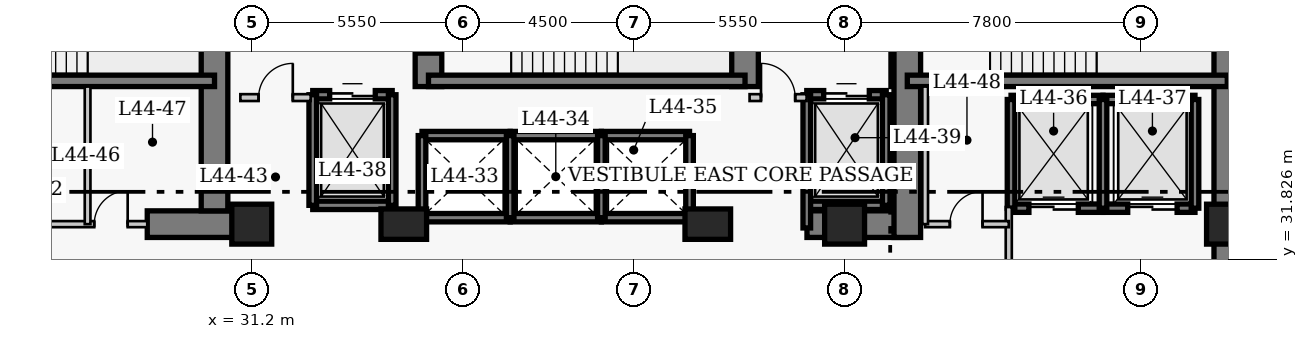
"""IFC4 building model, lengths in metres.
Left out: names, types, materials, properties, quantities, classifications, styles, units other than length and angle.
Written with IfcOpenShell. Run it as: python <this file> out.ifc"""

import sys

from ifc_helpers import new_model, si_unit, direction, frame, frame_2d, origin, origin_2d, place, context, subcontext, project, spatial, rectangle, extrude, element, fill, save


model = new_model("IFC4")
c1 = context("Model", 3, precision=1e-05, world=origin(), true_north=direction((0.0, 1.0)))
c2 = subcontext(c1, "Body", "Model", "MODEL_VIEW")
j1 = project(units=[si_unit("LENGTHUNIT", "METRE"), si_unit("PLANEANGLEUNIT", "RADIAN")], contexts=[c1])
p1 = place(None, origin())
s1 = spatial("IfcSite", under=j1, at=p1, CompositionType="ELEMENT")
p2 = place(p1, origin())
s2 = spatial("IfcBuilding", under=s1, at=p2, CompositionType="ELEMENT")
p3 = place(p2, frame((0.0, 0.0, 176.4)))
s3 = spatial("IfcBuildingStorey", under=s2, at=p3, CompositionType="ELEMENT", Elevation=176.4)
p4 = place(p3, frame((56.87, 27.05, 0.0), z_axis=(0.0, 0.0, 1.0), x_axis=(0.0, 1.0, 0.0)))
e1 = element("IfcWall", 1, at=p4, inside=s3, PredefinedType="SHEAR", context=c2, shape_type="SweptSolid", body=[
    extrude(rectangle(XDim=13.62, YDim=0.7, at=frame_2d((6.81, 0.0))), origin(), (0.0, 0.0, 1.0), 3.8),
])
p5 = place(p3, frame((28.45, 32.75, 0.0), z_axis=(0.0, 0.0, 1.0), x_axis=(1.0, 0.0, 0.0)))
e2 = element("IfcWall", 2, at=p5, inside=s3, PredefinedType="SHEAR", context=c2, shape_type="SweptSolid", body=[
    extrude(rectangle(XDim=2.4, YDim=0.7, at=frame_2d((1.2, 0.0))), origin(), (0.0, 0.0, 1.0), 3.8),
])
p6 = place(p3, frame((45.81, 32.75, 0.0), z_axis=(0.0, 0.0, 1.0), x_axis=(1.0, 0.0, 0.0)))
e3 = element("IfcWall", 3, at=p6, inside=s3, PredefinedType="SHEAR", context=c2, shape_type="SweptSolid", body=[
    extrude(rectangle(XDim=2.64, YDim=0.7, at=frame_2d((1.32, 0.0))), origin(), (0.0, 0.0, 1.0), 3.8),
])
p7 = place(p3, frame((30.22, 33.1, 0.0), z_axis=(0.0, 0.0, 1.0), x_axis=(0.0, 1.0, 0.0)))
e4 = element("IfcWall", 4, at=p7, inside=s3, PredefinedType="SHEAR", context=c2, shape_type="SweptSolid", body=[
    extrude(rectangle(XDim=7.22, YDim=0.7, at=frame_2d((3.61, 0.0))), origin(), (0.0, 0.0, 1.0), 3.8),
])
p8 = place(p3, frame((35.85, 36.37, 0.0), z_axis=(0.0, 0.0, 1.0), x_axis=(0.0, 1.0, 0.0)))
e5 = element("IfcWall", 5, at=p8, inside=s3, PredefinedType="SHEAR", context=c2, shape_type="SweptSolid", body=[
    extrude(rectangle(XDim=3.95, YDim=0.7, at=frame_2d((1.975, 0.0))), origin(), (0.0, 0.0, 1.0), 3.8),
])
p9 = place(p8, frame((0.88, 0.0, 0.0)))
e6 = element("IfcOpeningElement", 6, at=p9, cuts=e5, PredefinedType="OPENING", context=c2, shape_type="SweptSolid", body=[
    extrude(rectangle(XDim=1.1, YDim=2.15, at=frame_2d((0.55, 1.075))), frame((0.0, 0.36, 0.0), z_axis=(0.0, -1.0, 0.0), x_axis=(1.0, 0.0, 0.0)), (0.0, 0.0, 1.0), 0.72),
])
p10 = place(p3, frame((44.18, 36.37, 0.0), z_axis=(0.0, 0.0, 1.0), x_axis=(0.0, 1.0, 0.0)))
e7 = element("IfcWall", 7, at=p10, inside=s3, PredefinedType="SHEAR", context=c2, shape_type="SweptSolid", body=[
    extrude(rectangle(XDim=3.95, YDim=0.7, at=frame_2d((1.975, 0.0))), origin(), (0.0, 0.0, 1.0), 3.8),
])
p11 = place(p3, frame((48.45, 32.4, 0.0), z_axis=(0.0, 0.0, 1.0), x_axis=(0.0, 1.0, 0.0)))
e8 = element("IfcWall", 8, at=p11, inside=s3, PredefinedType="SHEAR", context=c2, shape_type="SweptSolid", body=[
    extrude(rectangle(XDim=7.92, YDim=0.7, at=frame_2d((3.96, 0.0))), origin(), (0.0, 0.0, 1.0), 3.8),
])
p12 = place(p11, frame((5.8, 0.0, 0.0)))
e9 = element("IfcOpeningElement", 9, at=p12, cuts=e8, PredefinedType="OPENING", context=c2, shape_type="SweptSolid", body=[
    extrude(rectangle(XDim=1.1, YDim=2.15, at=frame_2d((0.55, 1.075))), frame((0.0, 0.36, 0.0), z_axis=(0.0, -1.0, 0.0), x_axis=(1.0, 0.0, 0.0)), (0.0, 0.0, 1.0), 0.72),
])
p13 = place(p3, frame((21.9, 36.52, 0.0), z_axis=(0.0, 0.0, 1.0), x_axis=(1.0, 0.0, 0.0)))
e10 = element("IfcWall", 10, at=p13, inside=s3, PredefinedType="SHEAR", context=c2, shape_type="SweptSolid", body=[
    extrude(rectangle(XDim=8.32, YDim=0.3, at=frame_2d((4.16, 0.0))), origin(), (0.0, 0.0, 1.0), 3.8),
])
p14 = place(p13, frame((0.9, 0.0, 0.0)))
e11 = element("IfcOpeningElement", 11, at=p14, cuts=e10, PredefinedType="OPENING", context=c2, shape_type="SweptSolid", body=[
    extrude(rectangle(XDim=1.1, YDim=2.15, at=frame_2d((0.55, 1.075))), frame((0.0, 0.16, 0.0), z_axis=(0.0, -1.0, 0.0), x_axis=(1.0, 0.0, 0.0)), (0.0, 0.0, 1.0), 0.32),
])
p15 = place(p3, frame((35.85, 36.52, 0.0), z_axis=(0.0, 0.0, 1.0), x_axis=(1.0, 0.0, 0.0)))
e12 = element("IfcWall", 12, at=p15, inside=s3, PredefinedType="SHEAR", context=c2, shape_type="SweptSolid", body=[
    extrude(rectangle(XDim=8.33, YDim=0.3, at=frame_2d((4.165, 0.0))), origin(), (0.0, 0.0, 1.0), 3.8),
])
p16 = place(p3, frame((48.45, 36.52, 0.0), z_axis=(0.0, 0.0, 1.0), x_axis=(1.0, 0.0, 0.0)))
e13 = element("IfcWall", 13, at=p16, inside=s3, PredefinedType="SHEAR", context=c2, shape_type="SweptSolid", body=[
    extrude(rectangle(XDim=8.42, YDim=0.3, at=frame_2d((4.21, 0.0))), origin(), (0.0, 0.0, 1.0), 3.8),
])
p17 = place(p3, frame((31.2, 32.75, 0.0), z_axis=(0.0, 0.0, 1.0), x_axis=(1.0, 0.0, 0.0)))
e14 = element("IfcColumn", 14, at=p17, inside=s3, PredefinedType="COLUMN", context=c2, shape_type="SweptSolid", body=[
    extrude(rectangle(XDim=1.05, YDim=1.05, at=origin_2d()), origin(), (0.0, 0.0, 1.0), 3.8),
])
for number, where, z_axis, x_axis in (
    (15, (35.2, 32.75, 0.0), (0.0, 0.0, 1.0), (1.0, 0.0, 0.0)),
    (16, (43.2, 32.75, 0.0), (0.0, 0.0, 1.0), (1.0, 0.0, 0.0)),
):
    element("IfcColumn", number, at=place(p3, frame(where, z_axis=z_axis, x_axis=x_axis)), inside=s3, PredefinedType="COLUMN", context=c2, shape_type="SweptSolid", body=[
        extrude(rectangle(XDim=1.2, YDim=0.8, at=origin_2d()), origin(), (0.0, 0.0, 1.0), 3.8),
    ])
for number, where, z_axis, x_axis in (
    (17, (46.8, 32.75, 0.0), (0.0, 0.0, 1.0), (1.0, 0.0, 0.0)),
    (18, (56.85, 32.75, 0.0), (0.0, 0.0, 1.0), (1.0, 0.0, 0.0)),
):
    element("IfcColumn", number, at=place(p3, frame(where, z_axis=z_axis, x_axis=x_axis)), inside=s3, PredefinedType="COLUMN", context=c2, shape_type="SweptSolid", body=[
        extrude(rectangle(XDim=1.05, YDim=1.05, at=origin_2d()), origin(), (0.0, 0.0, 1.0), 3.8),
    ])
for number, where, z_axis, x_axis in (
    (19, (35.68, 35.08, 0.0), (0.0, 0.0, 1.0), (1.0, 0.0, 0.0)),
    (20, (35.68, 32.92, 0.0), (0.0, 0.0, 1.0), (1.0, 0.0, 0.0)),
):
    element("IfcWall", number, at=place(p3, frame(where, z_axis=z_axis, x_axis=x_axis)), inside=s3, PredefinedType="SHEAR", context=c2, shape_type="SweptSolid", body=[
        extrude(rectangle(XDim=2.32, YDim=0.22, at=frame_2d((1.16, 0.0))), origin(), (0.0, 0.0, 1.0), 3.8),
    ])
p18 = place(p3, frame((35.68, 32.92, 0.0), z_axis=(0.0, 0.0, 1.0), x_axis=(0.0, 1.0, 0.0)))
e21 = element("IfcWall", 21, at=p18, inside=s3, PredefinedType="SHEAR", context=c2, shape_type="SweptSolid", body=[
    extrude(rectangle(XDim=2.16, YDim=0.2, at=frame_2d((1.08, 0.0))), origin(), (0.0, 0.0, 1.0), 3.8),
])
for number, where, z_axis, x_axis in (
    (22, (38.0, 35.08, 0.0), (0.0, 0.0, 1.0), (1.0, 0.0, 0.0)),
    (23, (38.0, 32.92, 0.0), (0.0, 0.0, 1.0), (1.0, 0.0, 0.0)),
):
    element("IfcWall", number, at=place(p3, frame(where, z_axis=z_axis, x_axis=x_axis)), inside=s3, PredefinedType="SHEAR", context=c2, shape_type="SweptSolid", body=[
        extrude(rectangle(XDim=2.4, YDim=0.22, at=frame_2d((1.2, 0.0))), origin(), (0.0, 0.0, 1.0), 3.8),
    ])
p19 = place(p3, frame((38.0, 32.92, 0.0), z_axis=(0.0, 0.0, 1.0), x_axis=(0.0, 1.0, 0.0)))
e24 = element("IfcWall", 24, at=p19, inside=s3, PredefinedType="SHEAR", context=c2, shape_type="SweptSolid", body=[
    extrude(rectangle(XDim=2.16, YDim=0.2, at=frame_2d((1.08, 0.0))), origin(), (0.0, 0.0, 1.0), 3.8),
])
for number, where, z_axis, x_axis in (
    (25, (40.4, 35.08, 0.0), (0.0, 0.0, 1.0), (1.0, 0.0, 0.0)),
    (26, (40.4, 32.92, 0.0), (0.0, 0.0, 1.0), (1.0, 0.0, 0.0)),
):
    element("IfcWall", number, at=place(p3, frame(where, z_axis=z_axis, x_axis=x_axis)), inside=s3, PredefinedType="SHEAR", context=c2, shape_type="SweptSolid", body=[
        extrude(rectangle(XDim=2.32, YDim=0.22, at=frame_2d((1.16, 0.0))), origin(), (0.0, 0.0, 1.0), 3.8),
    ])
for number, where, z_axis, x_axis in (
    (27, (40.4, 32.92, 0.0), (0.0, 0.0, 1.0), (0.0, 1.0, 0.0)),
    (28, (42.72, 32.92, 0.0), (0.0, 0.0, 1.0), (0.0, 1.0, 0.0)),
):
    element("IfcWall", number, at=place(p3, frame(where, z_axis=z_axis, x_axis=x_axis)), inside=s3, PredefinedType="SHEAR", context=c2, shape_type="SweptSolid", body=[
        extrude(rectangle(XDim=2.16, YDim=0.2, at=frame_2d((1.08, 0.0))), origin(), (0.0, 0.0, 1.0), 3.8),
    ])
p20 = place(p3, frame((51.18, 36.03, 0.0), z_axis=(0.0, 0.0, 1.0), x_axis=(1.0, 0.0, 0.0)))
e29 = element("IfcWall", 29, at=p20, inside=s3, PredefinedType="SHEAR", context=c2, shape_type="SweptSolid", body=[
    extrude(rectangle(XDim=2.42, YDim=0.22, at=frame_2d((1.21, 0.0))), origin(), (0.0, 0.0, 1.0), 3.8),
])
p21 = place(p3, frame((51.18, 33.17, 0.0), z_axis=(0.0, 0.0, 1.0), x_axis=(1.0, 0.0, 0.0)))
e30 = element("IfcWall", 30, at=p21, inside=s3, PredefinedType="SHEAR", context=c2, shape_type="SweptSolid", body=[
    extrude(rectangle(XDim=2.42, YDim=0.22, at=frame_2d((1.21, 0.0))), origin(), (0.0, 0.0, 1.0), 3.8),
])
p22 = place(p21, frame((0.47, 0.0, 0.0)))
e31 = element("IfcOpeningElement", 31, at=p22, cuts=e30, PredefinedType="OPENING", context=c2, shape_type="SweptSolid", body=[
    extrude(rectangle(XDim=1.3, YDim=2.15, at=frame_2d((0.65, 1.075))), frame((0.0, 0.12, 0.0), z_axis=(0.0, -1.0, 0.0), x_axis=(1.0, 0.0, 0.0)), (0.0, 0.0, 1.0), 0.24),
])
p23 = place(p3, frame((51.18, 33.17, 0.0), z_axis=(0.0, 0.0, 1.0), x_axis=(0.0, 1.0, 0.0)))
e32 = element("IfcWall", 32, at=p23, inside=s3, PredefinedType="SHEAR", context=c2, shape_type="SweptSolid", body=[
    extrude(rectangle(XDim=2.86, YDim=0.2, at=frame_2d((1.43, 0.0))), origin(), (0.0, 0.0, 1.0), 3.8),
])
p24 = place(p3, frame((53.6, 36.03, 0.0), z_axis=(0.0, 0.0, 1.0), x_axis=(1.0, 0.0, 0.0)))
e33 = element("IfcWall", 33, at=p24, inside=s3, PredefinedType="SHEAR", context=c2, shape_type="SweptSolid", body=[
    extrude(rectangle(XDim=2.42, YDim=0.22, at=frame_2d((1.21, 0.0))), origin(), (0.0, 0.0, 1.0), 3.8),
])
p25 = place(p3, frame((53.6, 33.17, 0.0), z_axis=(0.0, 0.0, 1.0), x_axis=(1.0, 0.0, 0.0)))
e34 = element("IfcWall", 34, at=p25, inside=s3, PredefinedType="SHEAR", context=c2, shape_type="SweptSolid", body=[
    extrude(rectangle(XDim=2.42, YDim=0.22, at=frame_2d((1.21, 0.0))), origin(), (0.0, 0.0, 1.0), 3.8),
])
p26 = place(p25, frame((0.65, 0.0, 0.0)))
e35 = element("IfcOpeningElement", 35, at=p26, cuts=e34, PredefinedType="OPENING", context=c2, shape_type="SweptSolid", body=[
    extrude(rectangle(XDim=1.3, YDim=2.15, at=frame_2d((0.65, 1.075))), frame((0.0, 0.12, 0.0), z_axis=(0.0, -1.0, 0.0), x_axis=(1.0, 0.0, 0.0)), (0.0, 0.0, 1.0), 0.24),
])
for number, where, z_axis, x_axis in (
    (36, (53.6, 33.17, 0.0), (0.0, 0.0, 1.0), (0.0, 1.0, 0.0)),
    (37, (56.02, 33.17, 0.0), (0.0, 0.0, 1.0), (0.0, 1.0, 0.0)),
):
    element("IfcWall", number, at=place(p3, frame(where, z_axis=z_axis, x_axis=x_axis)), inside=s3, PredefinedType="SHEAR", context=c2, shape_type="SweptSolid", body=[
        extrude(rectangle(XDim=2.86, YDim=0.2, at=frame_2d((1.43, 0.0))), origin(), (0.0, 0.0, 1.0), 3.8),
    ])
p27 = place(p3, frame((32.805, 36.155, 0.0), z_axis=(0.0, 0.0, 1.0), x_axis=(1.0, 0.0, 0.0)))
e38 = element("IfcWall", 38, at=p27, inside=s3, PredefinedType="SHEAR", context=c2, shape_type="SweptSolid", body=[
    extrude(rectangle(XDim=2.09, YDim=0.22, at=frame_2d((1.045, 0.0))), origin(), (0.0, 0.0, 1.0), 3.8),
])
p28 = place(p27, frame((0.445, 0.0, 0.0)))
e39 = element("IfcOpeningElement", 39, at=p28, cuts=e38, PredefinedType="OPENING", context=c2, shape_type="SweptSolid", body=[
    extrude(rectangle(XDim=1.2, YDim=2.15, at=frame_2d((0.6, 1.075))), frame((0.0, 0.12, 0.0), z_axis=(0.0, -1.0, 0.0), x_axis=(1.0, 0.0, 0.0)), (0.0, 0.0, 1.0), 0.24),
])
p29 = place(p3, frame((32.805, 33.245, 0.0), z_axis=(0.0, 0.0, 1.0), x_axis=(1.0, 0.0, 0.0)))
e40 = element("IfcWall", 40, at=p29, inside=s3, PredefinedType="SHEAR", context=c2, shape_type="SweptSolid", body=[
    extrude(rectangle(XDim=2.09, YDim=0.22, at=frame_2d((1.045, 0.0))), origin(), (0.0, 0.0, 1.0), 3.8),
])
for number, where, z_axis, x_axis in (
    (41, (32.805, 33.245, 0.0), (0.0, 0.0, 1.0), (0.0, 1.0, 0.0)),
    (42, (34.895, 33.245, 0.0), (0.0, 0.0, 1.0), (0.0, 1.0, 0.0)),
):
    element("IfcWall", number, at=place(p3, frame(where, z_axis=z_axis, x_axis=x_axis)), inside=s3, PredefinedType="SHEAR", context=c2, shape_type="SweptSolid", body=[
        extrude(rectangle(XDim=2.91, YDim=0.2, at=frame_2d((1.455, 0.0))), origin(), (0.0, 0.0, 1.0), 3.8),
    ])
p30 = place(p3, frame((45.805, 36.155, 0.0), z_axis=(0.0, 0.0, 1.0), x_axis=(1.0, 0.0, 0.0)))
e43 = element("IfcWall", 43, at=p30, inside=s3, PredefinedType="SHEAR", context=c2, shape_type="SweptSolid", body=[
    extrude(rectangle(XDim=2.09, YDim=0.22, at=frame_2d((1.045, 0.0))), origin(), (0.0, 0.0, 1.0), 3.8),
])
p31 = place(p30, frame((0.445, 0.0, 0.0)))
e44 = element("IfcOpeningElement", 44, at=p31, cuts=e43, PredefinedType="OPENING", context=c2, shape_type="SweptSolid", body=[
    extrude(rectangle(XDim=1.2, YDim=2.15, at=frame_2d((0.6, 1.075))), frame((0.0, 0.12, 0.0), z_axis=(0.0, -1.0, 0.0), x_axis=(1.0, 0.0, 0.0)), (0.0, 0.0, 1.0), 0.24),
])
p32 = place(p3, frame((45.805, 33.245, 0.0), z_axis=(0.0, 0.0, 1.0), x_axis=(1.0, 0.0, 0.0)))
e45 = element("IfcWall", 45, at=p32, inside=s3, PredefinedType="SHEAR", context=c2, shape_type="SweptSolid", body=[
    extrude(rectangle(XDim=2.09, YDim=0.22, at=frame_2d((1.045, 0.0))), origin(), (0.0, 0.0, 1.0), 3.8),
])
p33 = place(p3, frame((45.805, 32.65, 0.0), z_axis=(0.0, 0.0, 1.0), x_axis=(0.0, 1.0, 0.0)))
e46 = element("IfcWall", 46, at=p33, inside=s3, PredefinedType="SHEAR", context=c2, shape_type="SweptSolid", body=[
    extrude(rectangle(XDim=3.505, YDim=0.2, at=frame_2d((1.752, 0.0))), origin(), (0.0, 0.0, 1.0), 3.8),
])
p34 = place(p3, frame((47.895, 33.245, 0.0), z_axis=(0.0, 0.0, 1.0), x_axis=(0.0, 1.0, 0.0)))
e47 = element("IfcWall", 47, at=p34, inside=s3, PredefinedType="SHEAR", context=c2, shape_type="SweptSolid", body=[
    extrude(rectangle(XDim=2.91, YDim=0.2, at=frame_2d((1.455, 0.0))), origin(), (0.0, 0.0, 1.0), 3.8),
])
p35 = place(p3, frame((30.9, 36.08, 0.0), z_axis=(0.0, 0.0, 1.0), x_axis=(1.0, 0.0, 0.0)))
e48 = element("IfcWall", 48, at=p35, inside=s3, PredefinedType="PARTITIONING", context=c2, shape_type="SweptSolid", body=[
    extrude(rectangle(XDim=1.85, YDim=0.18, at=frame_2d((0.925, 0.0))), origin(), (0.0, 0.0, 1.0), 3.55),
])
p36 = place(p35, frame((0.48, 0.0, 0.0)))
e49 = element("IfcOpeningElement", 49, at=p36, cuts=e48, PredefinedType="OPENING", context=c2, shape_type="SweptSolid", body=[
    extrude(rectangle(XDim=0.9, YDim=2.15, at=frame_2d((0.45, 1.075))), frame((0.0, 0.1, 0.0), z_axis=(0.0, -1.0, 0.0), x_axis=(1.0, 0.0, 0.0)), (0.0, 0.0, 1.0), 0.2),
])
p37 = place(p3, frame((44.3, 36.08, 0.0), z_axis=(0.0, 0.0, 1.0), x_axis=(1.0, 0.0, 0.0)))
e50 = element("IfcWall", 50, at=p37, inside=s3, PredefinedType="PARTITIONING", context=c2, shape_type="SweptSolid", body=[
    extrude(rectangle(XDim=1.5, YDim=0.18, at=frame_2d((0.75, 0.0))), origin(), (0.0, 0.0, 1.0), 3.55),
])
p38 = place(p37, frame((0.3, 0.0, 0.0)))
e51 = element("IfcOpeningElement", 51, at=p38, cuts=e50, PredefinedType="OPENING", context=c2, shape_type="SweptSolid", body=[
    extrude(rectangle(XDim=0.9, YDim=2.15, at=frame_2d((0.45, 1.075))), frame((0.0, 0.1, 0.0), z_axis=(0.0, -1.0, 0.0), x_axis=(1.0, 0.0, 0.0)), (0.0, 0.0, 1.0), 0.2),
])
p39 = place(p3, frame((51.12, 29.5, 0.0), z_axis=(0.0, 0.0, 1.0), x_axis=(0.0, 1.0, 0.0)))
e52 = element("IfcWall", 52, at=p39, inside=s3, PredefinedType="PARTITIONING", context=c2, shape_type="SweptSolid", body=[
    extrude(rectangle(XDim=3.7, YDim=0.16, at=frame_2d((1.85, 0.0))), origin(), (0.0, 0.0, 1.0), 3.55),
])
p40 = place(p39, frame((0.9, 0.0, 0.0)))
e53 = element("IfcOpeningElement", 53, at=p40, cuts=e52, PredefinedType="OPENING", context=c2, shape_type="SweptSolid", body=[
    extrude(rectangle(XDim=1.1, YDim=2.15, at=frame_2d((0.55, 1.075))), frame((0.0, 0.09, 0.0), z_axis=(0.0, -1.0, 0.0), x_axis=(1.0, 0.0, 0.0)), (0.0, 0.0, 1.0), 0.18),
])
p41 = place(p3, frame((24.48, 32.75, 0.0), z_axis=(0.0, 0.0, 1.0), x_axis=(1.0, 0.0, 0.0)))
e54 = element("IfcWall", 54, at=p41, inside=s3, PredefinedType="PARTITIONING", context=c2, shape_type="SweptSolid", body=[
    extrude(rectangle(XDim=3.97, YDim=0.16, at=frame_2d((1.985, 0.0))), origin(), (0.0, 0.0, 1.0), 3.55),
])
p42 = place(p41, frame((2.575, 0.0, 0.0)))
e55 = element("IfcOpeningElement", 55, at=p42, cuts=e54, PredefinedType="OPENING", context=c2, shape_type="SweptSolid", body=[
    extrude(rectangle(XDim=0.88, YDim=2.05, at=frame_2d((0.44, 1.025))), frame((0.0, 0.09, 0.0), z_axis=(0.0, -1.0, 0.0), x_axis=(1.0, 0.0, 0.0)), (0.0, 0.0, 1.0), 0.18),
])
p43 = place(p3, frame((48.92, 32.75, 0.0), z_axis=(0.0, 0.0, 1.0), x_axis=(1.0, 0.0, 0.0)))
e56 = element("IfcWall", 56, at=p43, inside=s3, PredefinedType="PARTITIONING", context=c2, shape_type="SweptSolid", body=[
    extrude(rectangle(XDim=2.2, YDim=0.16, at=frame_2d((1.1, 0.0))), origin(), (0.0, 0.0, 1.0), 3.55),
])
p44 = place(p43, frame((0.65, 0.0, 0.0)))
e57 = element("IfcOpeningElement", 57, at=p44, cuts=e56, PredefinedType="OPENING", context=c2, shape_type="SweptSolid", body=[
    extrude(rectangle(XDim=0.86, YDim=2.05, at=frame_2d((0.43, 1.025))), frame((0.0, 0.09, 0.0), z_axis=(0.0, -1.0, 0.0), x_axis=(1.0, 0.0, 0.0)), (0.0, 0.0, 1.0), 0.18),
])
for number, where, z_axis, x_axis in (
    (58, (48.92, 32.75, 0.0), (0.0, 0.0, 1.0), (0.0, 1.0, 0.0)),
    (59, (26.88, 32.75, 0.0), (0.0, 0.0, 1.0), (0.0, 1.0, 0.0)),
):
    element("IfcWall", number, at=place(p3, frame(where, z_axis=z_axis, x_axis=x_axis)), inside=s3, PredefinedType="PARTITIONING", context=c2, shape_type="SweptSolid", body=[
        extrude(rectangle(XDim=3.62, YDim=0.15, at=frame_2d((1.81, 0.0))), origin(), (0.0, 0.0, 1.0), 3.55),
    ])
p45 = place(p22, origin())
e60 = element("IfcDoor", 60, at=p45, inside=s3, OperationType="DOUBLE_DOOR_SLIDING", PredefinedType="DOOR", context=c2, shape_type="SweptSolid", body=[
    extrude(rectangle(XDim=1.3, YDim=2.15, at=frame_2d((0.65, 1.075))), frame((0.0, 0.025, 0.0), z_axis=(0.0, -1.0, 0.0), x_axis=(1.0, 0.0, 0.0)), (0.0, 0.0, 1.0), 0.05),
])
fill(e31, e60)
p46 = place(p26, origin())
e61 = element("IfcDoor", 61, at=p46, inside=s3, OperationType="DOUBLE_DOOR_SLIDING", PredefinedType="DOOR", context=c2, shape_type="SweptSolid", body=[
    extrude(rectangle(XDim=1.3, YDim=2.15, at=frame_2d((0.65, 1.075))), frame((0.0, 0.025, 0.0), z_axis=(0.0, -1.0, 0.0), x_axis=(1.0, 0.0, 0.0)), (0.0, 0.0, 1.0), 0.05),
])
fill(e35, e61)
p47 = place(p28, origin())
e62 = element("IfcDoor", 62, at=p47, inside=s3, OperationType="DOUBLE_DOOR_SLIDING", PredefinedType="DOOR", context=c2, shape_type="SweptSolid", body=[
    extrude(rectangle(XDim=1.2, YDim=2.15, at=frame_2d((0.6, 1.075))), frame((0.0, 0.025, 0.0), z_axis=(0.0, -1.0, 0.0), x_axis=(1.0, 0.0, 0.0)), (0.0, 0.0, 1.0), 0.05),
])
fill(e39, e62)
p48 = place(p31, origin())
e63 = element("IfcDoor", 63, at=p48, inside=s3, OperationType="DOUBLE_DOOR_SLIDING", PredefinedType="DOOR", context=c2, shape_type="SweptSolid", body=[
    extrude(rectangle(XDim=1.2, YDim=2.15, at=frame_2d((0.6, 1.075))), frame((0.0, 0.025, 0.0), z_axis=(0.0, -1.0, 0.0), x_axis=(1.0, 0.0, 0.0)), (0.0, 0.0, 1.0), 0.05),
])
fill(e44, e63)
p49 = place(p36, origin())
e64 = element("IfcDoor", 64, at=p49, inside=s3, OperationType="SINGLE_SWING_RIGHT", PredefinedType="DOOR", context=c2, shape_type="SweptSolid", body=[
    extrude(rectangle(XDim=0.9, YDim=2.15, at=frame_2d((0.45, 1.075))), frame((0.0, 0.025, 0.0), z_axis=(0.0, -1.0, 0.0), x_axis=(1.0, 0.0, 0.0)), (0.0, 0.0, 1.0), 0.05),
])
fill(e49, e64)
p50 = place(p38, origin())
e65 = element("IfcDoor", 65, at=p50, inside=s3, OperationType="SINGLE_SWING_LEFT", PredefinedType="DOOR", context=c2, shape_type="SweptSolid", body=[
    extrude(rectangle(XDim=0.9, YDim=2.15, at=frame_2d((0.45, 1.075))), frame((0.0, 0.025, 0.0), z_axis=(0.0, -1.0, 0.0), x_axis=(1.0, 0.0, 0.0)), (0.0, 0.0, 1.0), 0.05),
])
fill(e51, e65)
p51 = place(p42, origin())
e66 = element("IfcDoor", 66, at=p51, inside=s3, OperationType="SINGLE_SWING_RIGHT", PredefinedType="DOOR", context=c2, shape_type="SweptSolid", body=[
    extrude(rectangle(XDim=0.88, YDim=2.05, at=frame_2d((0.44, 1.025))), frame((0.0, 0.025, 0.0), z_axis=(0.0, -1.0, 0.0), x_axis=(1.0, 0.0, 0.0)), (0.0, 0.0, 1.0), 0.05),
])
fill(e55, e66)
p52 = place(p44, origin())
e67 = element("IfcDoor", 67, at=p52, inside=s3, OperationType="SINGLE_SWING_RIGHT", PredefinedType="DOOR", context=c2, shape_type="SweptSolid", body=[
    extrude(rectangle(XDim=0.86, YDim=2.05, at=frame_2d((0.43, 1.025))), frame((0.0, 0.025, 0.0), z_axis=(0.0, -1.0, 0.0), x_axis=(1.0, 0.0, 0.0)), (0.0, 0.0, 1.0), 0.05),
])
fill(e57, e67)
p53 = place(p9, origin())
e68 = element("IfcDoor", 68, at=p53, inside=s3, OperationType="SINGLE_SWING_RIGHT", PredefinedType="DOOR", context=c2, shape_type="SweptSolid", body=[
    extrude(rectangle(XDim=1.1, YDim=2.15, at=frame_2d((0.55, 1.075))), frame((0.0, 0.025, 0.0), z_axis=(0.0, -1.0, 0.0), x_axis=(1.0, 0.0, 0.0)), (0.0, 0.0, 1.0), 0.05),
])
fill(e6, e68)
save(model, sys.argv[1])
